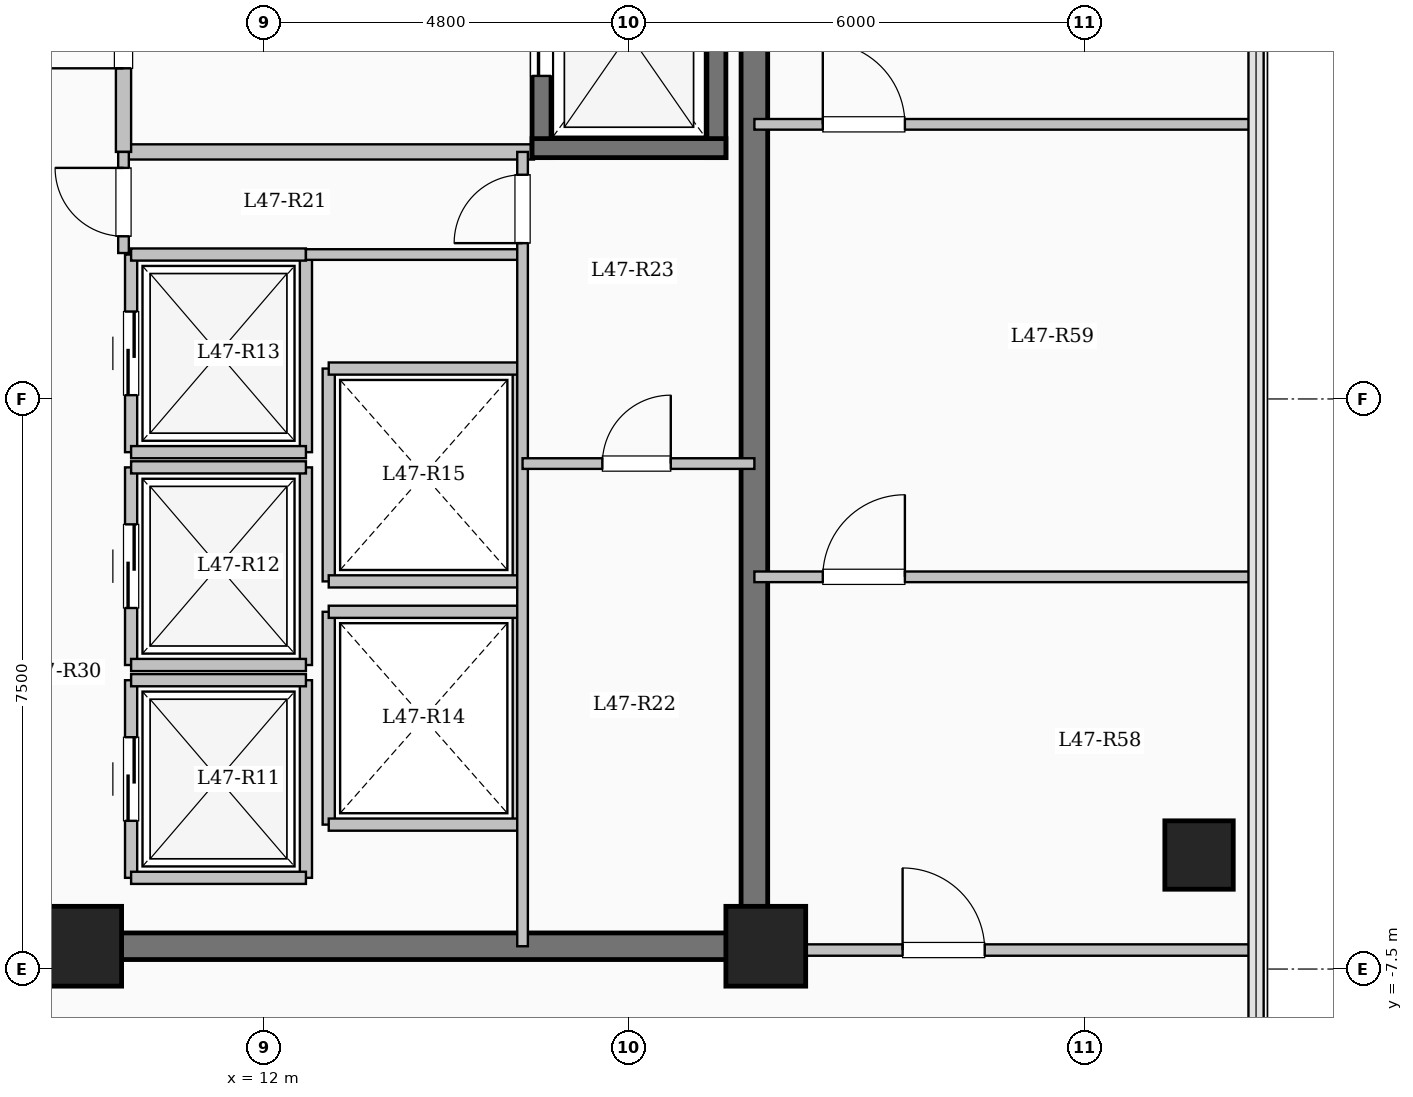
"""IFC4 building model, lengths in metres.
Left out: names, types, materials, properties, quantities, classifications, styles, units other than length and angle.
Written with IfcOpenShell. Run it as: python <this file> out.ifc"""

import sys

from ifc_helpers import new_model, si_unit, direction, frame, frame_2d, origin, origin_2d, place, context, subcontext, project, spatial, rectangle, extrude, element, fill, save


model = new_model("IFC4")
c1 = context("Model", 3, precision=1e-05, world=origin(), true_north=direction((0.0, 1.0)))
c2 = subcontext(c1, "Body", "Model", "MODEL_VIEW")
j1 = project(units=[si_unit("LENGTHUNIT", "METRE"), si_unit("PLANEANGLEUNIT", "RADIAN")], contexts=[c1])
p1 = place(None, origin())
s1 = spatial("IfcSite", under=j1, at=p1, CompositionType="ELEMENT")
p2 = place(p1, origin())
s2 = spatial("IfcBuilding", under=s1, at=p2, CompositionType="ELEMENT")
p3 = place(p2, frame((0.0, 0.0, 172.8)))
s3 = spatial("IfcBuildingStorey", under=s2, at=p3, CompositionType="ELEMENT", Elevation=172.8)
for number, where, z_axis, x_axis in (
    (1, (9.6, -7.2, 0.0), (0.0, 0.0, 1.0), (1.0, 0.0, 0.0)),
    (2, (18.6, -7.2, 0.0), (0.0, 0.0, 1.0), (1.0, 0.0, 0.0)),
):
    element("IfcColumn", number, at=place(p3, frame(where, z_axis=z_axis, x_axis=x_axis)), inside=s3, PredefinedType="COLUMN", context=c2, shape_type="SweptSolid", body=[
        extrude(rectangle(XDim=1.05, YDim=1.05, at=origin_2d()), origin(), (0.0, 0.0, 1.0), 4.5),
    ])
p4 = place(p3, frame((24.3, -6.0, 0.0), z_axis=(0.0, 0.0, 1.0), x_axis=(1.0, 0.0, 0.0)))
e3 = element("IfcColumn", 3, at=p4, inside=s3, PredefinedType="COLUMN", context=c2, shape_type="SweptSolid", body=[
    extrude(rectangle(XDim=0.9, YDim=0.9, at=origin_2d()), origin(), (0.0, 0.0, 1.0), 4.5),
])
p5 = place(p3, frame((10.15, 3.25, 0.0), z_axis=(0.0, 0.0, 1.0), x_axis=(1.0, 0.0, 0.0)))
e4 = element("IfcWall", 4, at=p5, inside=s3, PredefinedType="SOLIDWALL", context=c2, shape_type="SweptSolid", body=[
    extrude(rectangle(XDim=5.4, YDim=0.2, at=frame_2d((2.7, 0.0))), origin(), (0.0, 0.0, 1.0), 4.2),
])
p6 = place(p3, frame((10.15, 3.25, 0.0), z_axis=(0.0, 0.0, 1.0), x_axis=(0.0, 1.0, 0.0)))
e5 = element("IfcWall", 5, at=p6, inside=s3, PredefinedType="SOLIDWALL", context=c2, shape_type="SweptSolid", body=[
    extrude(rectangle(XDim=3.25, YDim=0.2, at=frame_2d((1.625, 0.0))), origin(), (0.0, 0.0, 1.0), 4.2),
])
p7 = place(p6, frame((1.1, 0.0, 0.0)))
e6 = element("IfcOpeningElement", 6, at=p7, cuts=e5, PredefinedType="OPENING", context=c2, shape_type="SweptSolid", body=[
    extrude(rectangle(XDim=1.02, YDim=2.15, at=frame_2d((0.51, 1.075))), frame((0.0, 0.11, 0.0), z_axis=(0.0, -1.0, 0.0), x_axis=(1.0, 0.0, 0.0)), (0.0, 0.0, 1.0), 0.22),
])
p8 = place(p3, frame((15.65, 3.175, 0.0), z_axis=(0.0, 0.0, 1.0), x_axis=(0.0, 1.0, 0.0)))
e7 = element("IfcWall", 7, at=p8, inside=s3, PredefinedType="SHEAR", context=c2, shape_type="SweptSolid", body=[
    extrude(rectangle(XDim=3.25, YDim=0.25, at=frame_2d((1.625, 0.0))), origin(), (0.0, 0.0, 1.0), 4.5),
])
p9 = place(p8, frame((1.075, 0.0, 0.0)))
e8 = element("IfcOpeningElement", 8, at=p9, cuts=e7, PredefinedType="OPENING", context=c2, shape_type="SweptSolid", body=[
    extrude(rectangle(XDim=1.1, YDim=2.15, at=frame_2d((0.55, 1.075))), frame((0.0, 0.135, 0.0), z_axis=(0.0, -1.0, 0.0), x_axis=(1.0, 0.0, 0.0)), (0.0, 0.0, 1.0), 0.27),
])
p10 = place(p3, frame((17.95, 3.175, 0.0), z_axis=(0.0, 0.0, 1.0), x_axis=(0.0, 1.0, 0.0)))
e9 = element("IfcWall", 9, at=p10, inside=s3, PredefinedType="SHEAR", context=c2, shape_type="SweptSolid", body=[
    extrude(rectangle(XDim=3.25, YDim=0.25, at=frame_2d((1.625, 0.0))), origin(), (0.0, 0.0, 1.0), 4.5),
])
p11 = place(p3, frame((15.525, 3.3, 0.0), z_axis=(0.0, 0.0, 1.0), x_axis=(1.0, 0.0, 0.0)))
e10 = element("IfcWall", 10, at=p11, inside=s3, PredefinedType="SHEAR", context=c2, shape_type="SweptSolid", body=[
    extrude(rectangle(XDim=2.55, YDim=0.25, at=frame_2d((1.275, 0.0))), origin(), (0.0, 0.0, 1.0), 4.5),
])
p12 = place(p3, frame((10.25, -6.3, 0.0), z_axis=(0.0, 0.0, 1.0), x_axis=(0.0, 1.0, 0.0)))
e11 = element("IfcWall", 11, at=p12, inside=s3, PredefinedType="SOLIDWALL", context=c2, shape_type="SweptSolid", body=[
    extrude(rectangle(XDim=2.6, YDim=0.16, at=frame_2d((1.3, 0.0))), origin(), (0.0, 0.0, 1.0), 4.2),
])
p13 = place(p12, frame((0.75, 0.0, 0.0)))
e12 = element("IfcOpeningElement", 12, at=p13, cuts=e11, PredefinedType="OPENING", context=c2, shape_type="SweptSolid", body=[
    extrude(rectangle(XDim=1.1, YDim=2.15, at=frame_2d((0.55, 1.075))), frame((0.0, 0.09, 0.0), z_axis=(0.0, -1.0, 0.0), x_axis=(1.0, 0.0, 0.0)), (0.0, 0.0, 1.0), 0.18),
])
p14 = place(p3, frame((12.55, -6.3, 0.0), z_axis=(0.0, 0.0, 1.0), x_axis=(0.0, 1.0, 0.0)))
e13 = element("IfcWall", 13, at=p14, inside=s3, PredefinedType="SOLIDWALL", context=c2, shape_type="SweptSolid", body=[
    extrude(rectangle(XDim=2.6, YDim=0.16, at=frame_2d((1.3, 0.0))), origin(), (0.0, 0.0, 1.0), 4.2),
])
for number, where, z_axis, x_axis in (
    (14, (10.25, -6.3, 0.0), (0.0, 0.0, 1.0), (1.0, 0.0, 0.0)),
    (15, (10.25, -3.7, 0.0), (0.0, 0.0, 1.0), (1.0, 0.0, 0.0)),
):
    element("IfcWall", number, at=place(p3, frame(where, z_axis=z_axis, x_axis=x_axis)), inside=s3, PredefinedType="SOLIDWALL", context=c2, shape_type="SweptSolid", body=[
        extrude(rectangle(XDim=2.3, YDim=0.16, at=frame_2d((1.15, 0.0))), origin(), (0.0, 0.0, 1.0), 4.2),
    ])
p15 = place(p3, frame((10.25, -3.5, 0.0), z_axis=(0.0, 0.0, 1.0), x_axis=(0.0, 1.0, 0.0)))
e16 = element("IfcWall", 16, at=p15, inside=s3, PredefinedType="SOLIDWALL", context=c2, shape_type="SweptSolid", body=[
    extrude(rectangle(XDim=2.6, YDim=0.16, at=frame_2d((1.3, 0.0))), origin(), (0.0, 0.0, 1.0), 4.2),
])
p16 = place(p15, frame((0.75, 0.0, 0.0)))
e17 = element("IfcOpeningElement", 17, at=p16, cuts=e16, PredefinedType="OPENING", context=c2, shape_type="SweptSolid", body=[
    extrude(rectangle(XDim=1.1, YDim=2.15, at=frame_2d((0.55, 1.075))), frame((0.0, 0.09, 0.0), z_axis=(0.0, -1.0, 0.0), x_axis=(1.0, 0.0, 0.0)), (0.0, 0.0, 1.0), 0.18),
])
p17 = place(p3, frame((12.55, -3.5, 0.0), z_axis=(0.0, 0.0, 1.0), x_axis=(0.0, 1.0, 0.0)))
e18 = element("IfcWall", 18, at=p17, inside=s3, PredefinedType="SOLIDWALL", context=c2, shape_type="SweptSolid", body=[
    extrude(rectangle(XDim=2.6, YDim=0.16, at=frame_2d((1.3, 0.0))), origin(), (0.0, 0.0, 1.0), 4.2),
])
for number, where, z_axis, x_axis in (
    (19, (10.25, -3.5, 0.0), (0.0, 0.0, 1.0), (1.0, 0.0, 0.0)),
    (20, (10.25, -0.9, 0.0), (0.0, 0.0, 1.0), (1.0, 0.0, 0.0)),
):
    element("IfcWall", number, at=place(p3, frame(where, z_axis=z_axis, x_axis=x_axis)), inside=s3, PredefinedType="SOLIDWALL", context=c2, shape_type="SweptSolid", body=[
        extrude(rectangle(XDim=2.3, YDim=0.16, at=frame_2d((1.15, 0.0))), origin(), (0.0, 0.0, 1.0), 4.2),
    ])
p18 = place(p3, frame((10.25, -0.7, 0.0), z_axis=(0.0, 0.0, 1.0), x_axis=(0.0, 1.0, 0.0)))
e21 = element("IfcWall", 21, at=p18, inside=s3, PredefinedType="SOLIDWALL", context=c2, shape_type="SweptSolid", body=[
    extrude(rectangle(XDim=2.6, YDim=0.16, at=frame_2d((1.3, 0.0))), origin(), (0.0, 0.0, 1.0), 4.2),
])
p19 = place(p18, frame((0.75, 0.0, 0.0)))
e22 = element("IfcOpeningElement", 22, at=p19, cuts=e21, PredefinedType="OPENING", context=c2, shape_type="SweptSolid", body=[
    extrude(rectangle(XDim=1.1, YDim=2.15, at=frame_2d((0.55, 1.075))), frame((0.0, 0.09, 0.0), z_axis=(0.0, -1.0, 0.0), x_axis=(1.0, 0.0, 0.0)), (0.0, 0.0, 1.0), 0.18),
])
p20 = place(p3, frame((12.55, -0.7, 0.0), z_axis=(0.0, 0.0, 1.0), x_axis=(0.0, 1.0, 0.0)))
e23 = element("IfcWall", 23, at=p20, inside=s3, PredefinedType="SOLIDWALL", context=c2, shape_type="SweptSolid", body=[
    extrude(rectangle(XDim=2.6, YDim=0.16, at=frame_2d((1.3, 0.0))), origin(), (0.0, 0.0, 1.0), 4.2),
])
for number, where, z_axis, x_axis in (
    (24, (10.25, -0.7, 0.0), (0.0, 0.0, 1.0), (1.0, 0.0, 0.0)),
    (25, (10.25, 1.9, 0.0), (0.0, 0.0, 1.0), (1.0, 0.0, 0.0)),
):
    element("IfcWall", number, at=place(p3, frame(where, z_axis=z_axis, x_axis=x_axis)), inside=s3, PredefinedType="SOLIDWALL", context=c2, shape_type="SweptSolid", body=[
        extrude(rectangle(XDim=2.3, YDim=0.16, at=frame_2d((1.15, 0.0))), origin(), (0.0, 0.0, 1.0), 4.2),
    ])
for number, where, z_axis, x_axis in (
    (26, (12.85, -5.6, 0.0), (0.0, 0.0, 1.0), (0.0, 1.0, 0.0)),
    (27, (15.35, -5.6, 0.0), (0.0, 0.0, 1.0), (0.0, 1.0, 0.0)),
):
    element("IfcWall", number, at=place(p3, frame(where, z_axis=z_axis, x_axis=x_axis)), inside=s3, PredefinedType="SOLIDWALL", context=c2, shape_type="SweptSolid", body=[
        extrude(rectangle(XDim=2.8, YDim=0.16, at=frame_2d((1.4, 0.0))), origin(), (0.0, 0.0, 1.0), 4.2),
    ])
for number, where, z_axis, x_axis in (
    (28, (12.85, -5.6, 0.0), (0.0, 0.0, 1.0), (1.0, 0.0, 0.0)),
    (29, (12.85, -2.8, 0.0), (0.0, 0.0, 1.0), (1.0, 0.0, 0.0)),
):
    element("IfcWall", number, at=place(p3, frame(where, z_axis=z_axis, x_axis=x_axis)), inside=s3, PredefinedType="SOLIDWALL", context=c2, shape_type="SweptSolid", body=[
        extrude(rectangle(XDim=2.5, YDim=0.16, at=frame_2d((1.25, 0.0))), origin(), (0.0, 0.0, 1.0), 4.2),
    ])
for number, where, z_axis, x_axis in (
    (30, (12.85, -2.4, 0.0), (0.0, 0.0, 1.0), (0.0, 1.0, 0.0)),
    (31, (15.35, -2.4, 0.0), (0.0, 0.0, 1.0), (0.0, 1.0, 0.0)),
):
    element("IfcWall", number, at=place(p3, frame(where, z_axis=z_axis, x_axis=x_axis)), inside=s3, PredefinedType="SOLIDWALL", context=c2, shape_type="SweptSolid", body=[
        extrude(rectangle(XDim=2.8, YDim=0.16, at=frame_2d((1.4, 0.0))), origin(), (0.0, 0.0, 1.0), 4.2),
    ])
for number, where, z_axis, x_axis in (
    (32, (12.85, -2.4, 0.0), (0.0, 0.0, 1.0), (1.0, 0.0, 0.0)),
    (33, (12.85, 0.4, 0.0), (0.0, 0.0, 1.0), (1.0, 0.0, 0.0)),
):
    element("IfcWall", number, at=place(p3, frame(where, z_axis=z_axis, x_axis=x_axis)), inside=s3, PredefinedType="SOLIDWALL", context=c2, shape_type="SweptSolid", body=[
        extrude(rectangle(XDim=2.5, YDim=0.16, at=frame_2d((1.25, 0.0))), origin(), (0.0, 0.0, 1.0), 4.2),
    ])
p21 = place(p3, frame((18.45, -7.375, 0.0), z_axis=(0.0, 0.0, 1.0), x_axis=(0.0, 1.0, 0.0)))
e34 = element("IfcWall", 34, at=p21, inside=s3, PredefinedType="SHEAR", context=c2, shape_type="SweptSolid", body=[
    extrude(rectangle(XDim=14.05, YDim=0.35, at=frame_2d((7.025, 0.0))), origin(), (0.0, 0.0, 1.0), 4.5),
])
p22 = place(p3, frame((10.075, -7.2, 0.0), z_axis=(0.0, 0.0, 1.0), x_axis=(1.0, 0.0, 0.0)))
e35 = element("IfcWall", 35, at=p22, inside=s3, PredefinedType="SHEAR", context=c2, shape_type="SweptSolid", body=[
    extrude(rectangle(XDim=8.55, YDim=0.35, at=frame_2d((4.275, 0.0))), origin(), (0.0, 0.0, 1.0), 4.5),
])
p23 = place(p3, frame((12.55, 1.9, 0.0), z_axis=(0.0, 0.0, 1.0), x_axis=(1.0, 0.0, 0.0)))
e36 = element("IfcWall", 36, at=p23, inside=s3, PredefinedType="PARTITIONING", context=c2, shape_type="SweptSolid", body=[
    extrude(rectangle(XDim=2.85, YDim=0.14, at=frame_2d((1.425, 0.0))), origin(), (0.0, 0.0, 1.0), 4.2),
])
p24 = place(p3, frame((10.15, 1.92, 0.0), z_axis=(0.0, 0.0, 1.0), x_axis=(0.0, 1.0, 0.0)))
e37 = element("IfcWall", 37, at=p24, inside=s3, PredefinedType="PARTITIONING", context=c2, shape_type="SweptSolid", body=[
    extrude(rectangle(XDim=1.33, YDim=0.14, at=frame_2d((0.665, 0.0))), origin(), (0.0, 0.0, 1.0), 4.2),
])
p25 = place(p24, frame((0.22, 0.0, 0.0)))
e38 = element("IfcOpeningElement", 38, at=p25, cuts=e37, PredefinedType="OPENING", context=c2, shape_type="SweptSolid", body=[
    extrude(rectangle(XDim=0.9, YDim=2.08, at=frame_2d((0.45, 1.04))), frame((0.0, 0.08, 0.0), z_axis=(0.0, -1.0, 0.0), x_axis=(1.0, 0.0, 0.0)), (0.0, 0.0, 1.0), 0.16),
])
p26 = place(p3, frame((15.4, -7.2, 0.0), z_axis=(0.0, 0.0, 1.0), x_axis=(0.0, 1.0, 0.0)))
e39 = element("IfcWall", 39, at=p26, inside=s3, PredefinedType="PARTITIONING", context=c2, shape_type="SweptSolid", body=[
    extrude(rectangle(XDim=10.45, YDim=0.14, at=frame_2d((5.225, 0.0))), origin(), (0.0, 0.0, 1.0), 4.2),
])
p27 = place(p26, frame((9.25, 0.0, 0.0)))
e40 = element("IfcOpeningElement", 40, at=p27, cuts=e39, PredefinedType="OPENING", context=c2, shape_type="SweptSolid", body=[
    extrude(rectangle(XDim=0.9, YDim=2.08, at=frame_2d((0.45, 1.04))), frame((0.0, 0.08, 0.0), z_axis=(0.0, -1.0, 0.0), x_axis=(1.0, 0.0, 0.0)), (0.0, 0.0, 1.0), 0.16),
])
p28 = place(p3, frame((15.4, -0.85, 0.0), z_axis=(0.0, 0.0, 1.0), x_axis=(1.0, 0.0, 0.0)))
e41 = element("IfcWall", 41, at=p28, inside=s3, PredefinedType="PARTITIONING", context=c2, shape_type="SweptSolid", body=[
    extrude(rectangle(XDim=3.05, YDim=0.14, at=frame_2d((1.525, 0.0))), origin(), (0.0, 0.0, 1.0), 4.2),
])
p29 = place(p28, frame((1.05, 0.0, 0.0)))
e42 = element("IfcOpeningElement", 42, at=p29, cuts=e41, PredefinedType="OPENING", context=c2, shape_type="SweptSolid", body=[
    extrude(rectangle(XDim=0.9, YDim=2.08, at=frame_2d((0.45, 1.04))), frame((0.0, 0.08, 0.0), z_axis=(0.0, -1.0, 0.0), x_axis=(1.0, 0.0, 0.0)), (0.0, 0.0, 1.0), 0.16),
])
p30 = place(p3, frame((18.45, -7.25, 0.0), z_axis=(0.0, 0.0, 1.0), x_axis=(1.0, 0.0, 0.0)))
e43 = element("IfcWall", 43, at=p30, inside=s3, PredefinedType="PARTITIONING", context=c2, shape_type="SweptSolid", body=[
    extrude(rectangle(XDim=6.63, YDim=0.15, at=frame_2d((3.315, 0.0))), origin(), (0.0, 0.0, 1.0), 4.2),
])
p31 = place(p30, frame((1.95, 0.0, 0.0)))
e44 = element("IfcOpeningElement", 44, at=p31, cuts=e43, PredefinedType="OPENING", context=c2, shape_type="SweptSolid", body=[
    extrude(rectangle(XDim=1.08, YDim=2.15, at=frame_2d((0.54, 1.075))), frame((0.0, 0.085, 0.0), z_axis=(0.0, -1.0, 0.0), x_axis=(1.0, 0.0, 0.0)), (0.0, 0.0, 1.0), 0.17),
])
p32 = place(p3, frame((18.45, -2.34, 0.0), z_axis=(0.0, 0.0, 1.0), x_axis=(1.0, 0.0, 0.0)))
e45 = element("IfcWall", 45, at=p32, inside=s3, PredefinedType="PARTITIONING", context=c2, shape_type="SweptSolid", body=[
    extrude(rectangle(XDim=6.63, YDim=0.14, at=frame_2d((3.315, 0.0))), origin(), (0.0, 0.0, 1.0), 4.2),
])
p33 = place(p32, frame((0.9, 0.0, 0.0)))
e46 = element("IfcOpeningElement", 46, at=p33, cuts=e45, PredefinedType="OPENING", context=c2, shape_type="SweptSolid", body=[
    extrude(rectangle(XDim=1.08, YDim=2.15, at=frame_2d((0.54, 1.075))), frame((0.0, 0.08, 0.0), z_axis=(0.0, -1.0, 0.0), x_axis=(1.0, 0.0, 0.0)), (0.0, 0.0, 1.0), 0.16),
])
p34 = place(p3, frame((18.45, 3.613, 0.0), z_axis=(0.0, 0.0, 1.0), x_axis=(1.0, 0.0, 0.0)))
e47 = element("IfcWall", 47, at=p34, inside=s3, PredefinedType="PARTITIONING", context=c2, shape_type="SweptSolid", body=[
    extrude(rectangle(XDim=6.63, YDim=0.14, at=frame_2d((3.315, 0.0))), origin(), (0.0, 0.0, 1.0), 4.2),
])
p35 = place(p34, frame((0.9, 0.0, 0.0)))
e48 = element("IfcOpeningElement", 48, at=p35, cuts=e47, PredefinedType="OPENING", context=c2, shape_type="SweptSolid", body=[
    extrude(rectangle(XDim=1.08, YDim=2.15, at=frame_2d((0.54, 1.075))), frame((0.0, 0.08, 0.0), z_axis=(0.0, -1.0, 0.0), x_axis=(1.0, 0.0, 0.0)), (0.0, 0.0, 1.0), 0.16),
])
p36 = place(p7, origin())
e49 = element("IfcDoor", 49, at=p36, inside=s3, OperationType="SINGLE_SWING_LEFT", PredefinedType="DOOR", context=c2, shape_type="SweptSolid", body=[
    extrude(rectangle(XDim=1.02, YDim=2.15, at=frame_2d((0.51, 1.075))), frame((0.0, 0.025, 0.0), z_axis=(0.0, -1.0, 0.0), x_axis=(1.0, 0.0, 0.0)), (0.0, 0.0, 1.0), 0.05),
])
fill(e6, e49)
p37 = place(p9, origin())
e50 = element("IfcDoor", 50, at=p37, inside=s3, OperationType="SLIDING_TO_LEFT", PredefinedType="DOOR", context=c2, shape_type="SweptSolid", body=[
    extrude(rectangle(XDim=1.1, YDim=2.15, at=frame_2d((0.55, 1.075))), frame((0.0, 0.025, 0.0), z_axis=(0.0, -1.0, 0.0), x_axis=(1.0, 0.0, 0.0)), (0.0, 0.0, 1.0), 0.05),
])
fill(e8, e50)
p38 = place(p13, origin())
e51 = element("IfcDoor", 51, at=p38, inside=s3, OperationType="SLIDING_TO_LEFT", PredefinedType="DOOR", context=c2, shape_type="SweptSolid", body=[
    extrude(rectangle(XDim=1.1, YDim=2.15, at=frame_2d((0.55, 1.075))), frame((0.0, 0.025, 0.0), z_axis=(0.0, -1.0, 0.0), x_axis=(1.0, 0.0, 0.0)), (0.0, 0.0, 1.0), 0.05),
])
fill(e12, e51)
p39 = place(p16, origin())
e52 = element("IfcDoor", 52, at=p39, inside=s3, OperationType="SLIDING_TO_LEFT", PredefinedType="DOOR", context=c2, shape_type="SweptSolid", body=[
    extrude(rectangle(XDim=1.1, YDim=2.15, at=frame_2d((0.55, 1.075))), frame((0.0, 0.025, 0.0), z_axis=(0.0, -1.0, 0.0), x_axis=(1.0, 0.0, 0.0)), (0.0, 0.0, 1.0), 0.05),
])
fill(e17, e52)
p40 = place(p19, origin())
e53 = element("IfcDoor", 53, at=p40, inside=s3, OperationType="SLIDING_TO_LEFT", PredefinedType="DOOR", context=c2, shape_type="SweptSolid", body=[
    extrude(rectangle(XDim=1.1, YDim=2.15, at=frame_2d((0.55, 1.075))), frame((0.0, 0.025, 0.0), z_axis=(0.0, -1.0, 0.0), x_axis=(1.0, 0.0, 0.0)), (0.0, 0.0, 1.0), 0.05),
])
fill(e22, e53)
p41 = place(p25, origin())
e54 = element("IfcDoor", 54, at=p41, inside=s3, OperationType="SINGLE_SWING_RIGHT", PredefinedType="DOOR", context=c2, shape_type="SweptSolid", body=[
    extrude(rectangle(XDim=0.9, YDim=2.08, at=frame_2d((0.45, 1.04))), frame((0.0, 0.025, 0.0), z_axis=(0.0, -1.0, 0.0), x_axis=(1.0, 0.0, 0.0)), (0.0, 0.0, 1.0), 0.05),
])
fill(e38, e54)
p42 = place(p27, origin())
e55 = element("IfcDoor", 55, at=p42, inside=s3, OperationType="SINGLE_SWING_LEFT", PredefinedType="DOOR", context=c2, shape_type="SweptSolid", body=[
    extrude(rectangle(XDim=0.9, YDim=2.08, at=frame_2d((0.45, 1.04))), frame((0.0, 0.025, 0.0), z_axis=(0.0, -1.0, 0.0), x_axis=(1.0, 0.0, 0.0)), (0.0, 0.0, 1.0), 0.05),
])
fill(e40, e55)
p43 = place(p29, origin())
e56 = element("IfcDoor", 56, at=p43, inside=s3, OperationType="SINGLE_SWING_RIGHT", PredefinedType="DOOR", context=c2, shape_type="SweptSolid", body=[
    extrude(rectangle(XDim=0.9, YDim=2.08, at=frame_2d((0.45, 1.04))), frame((0.0, 0.025, 0.0), z_axis=(0.0, -1.0, 0.0), x_axis=(1.0, 0.0, 0.0)), (0.0, 0.0, 1.0), 0.05),
])
fill(e42, e56)
p44 = place(p31, origin())
e57 = element("IfcDoor", 57, at=p44, inside=s3, OperationType="SINGLE_SWING_LEFT", PredefinedType="DOOR", context=c2, shape_type="SweptSolid", body=[
    extrude(rectangle(XDim=1.08, YDim=2.15, at=frame_2d((0.54, 1.075))), frame((0.0, 0.025, 0.0), z_axis=(0.0, -1.0, 0.0), x_axis=(1.0, 0.0, 0.0)), (0.0, 0.0, 1.0), 0.05),
])
fill(e44, e57)
p45 = place(p33, origin())
e58 = element("IfcDoor", 58, at=p45, inside=s3, OperationType="SINGLE_SWING_RIGHT", PredefinedType="DOOR", context=c2, shape_type="SweptSolid", body=[
    extrude(rectangle(XDim=1.08, YDim=2.15, at=frame_2d((0.54, 1.075))), frame((0.0, 0.025, 0.0), z_axis=(0.0, -1.0, 0.0), x_axis=(1.0, 0.0, 0.0)), (0.0, 0.0, 1.0), 0.05),
])
fill(e46, e58)
p46 = place(p35, origin())
e59 = element("IfcDoor", 59, at=p46, inside=s3, OperationType="SINGLE_SWING_LEFT", PredefinedType="DOOR", context=c2, shape_type="SweptSolid", body=[
    extrude(rectangle(XDim=1.08, YDim=2.15, at=frame_2d((0.54, 1.075))), frame((0.0, 0.025, 0.0), z_axis=(0.0, -1.0, 0.0), x_axis=(1.0, 0.0, 0.0)), (0.0, 0.0, 1.0), 0.05),
])
fill(e48, e59)
save(model, sys.argv[1])
